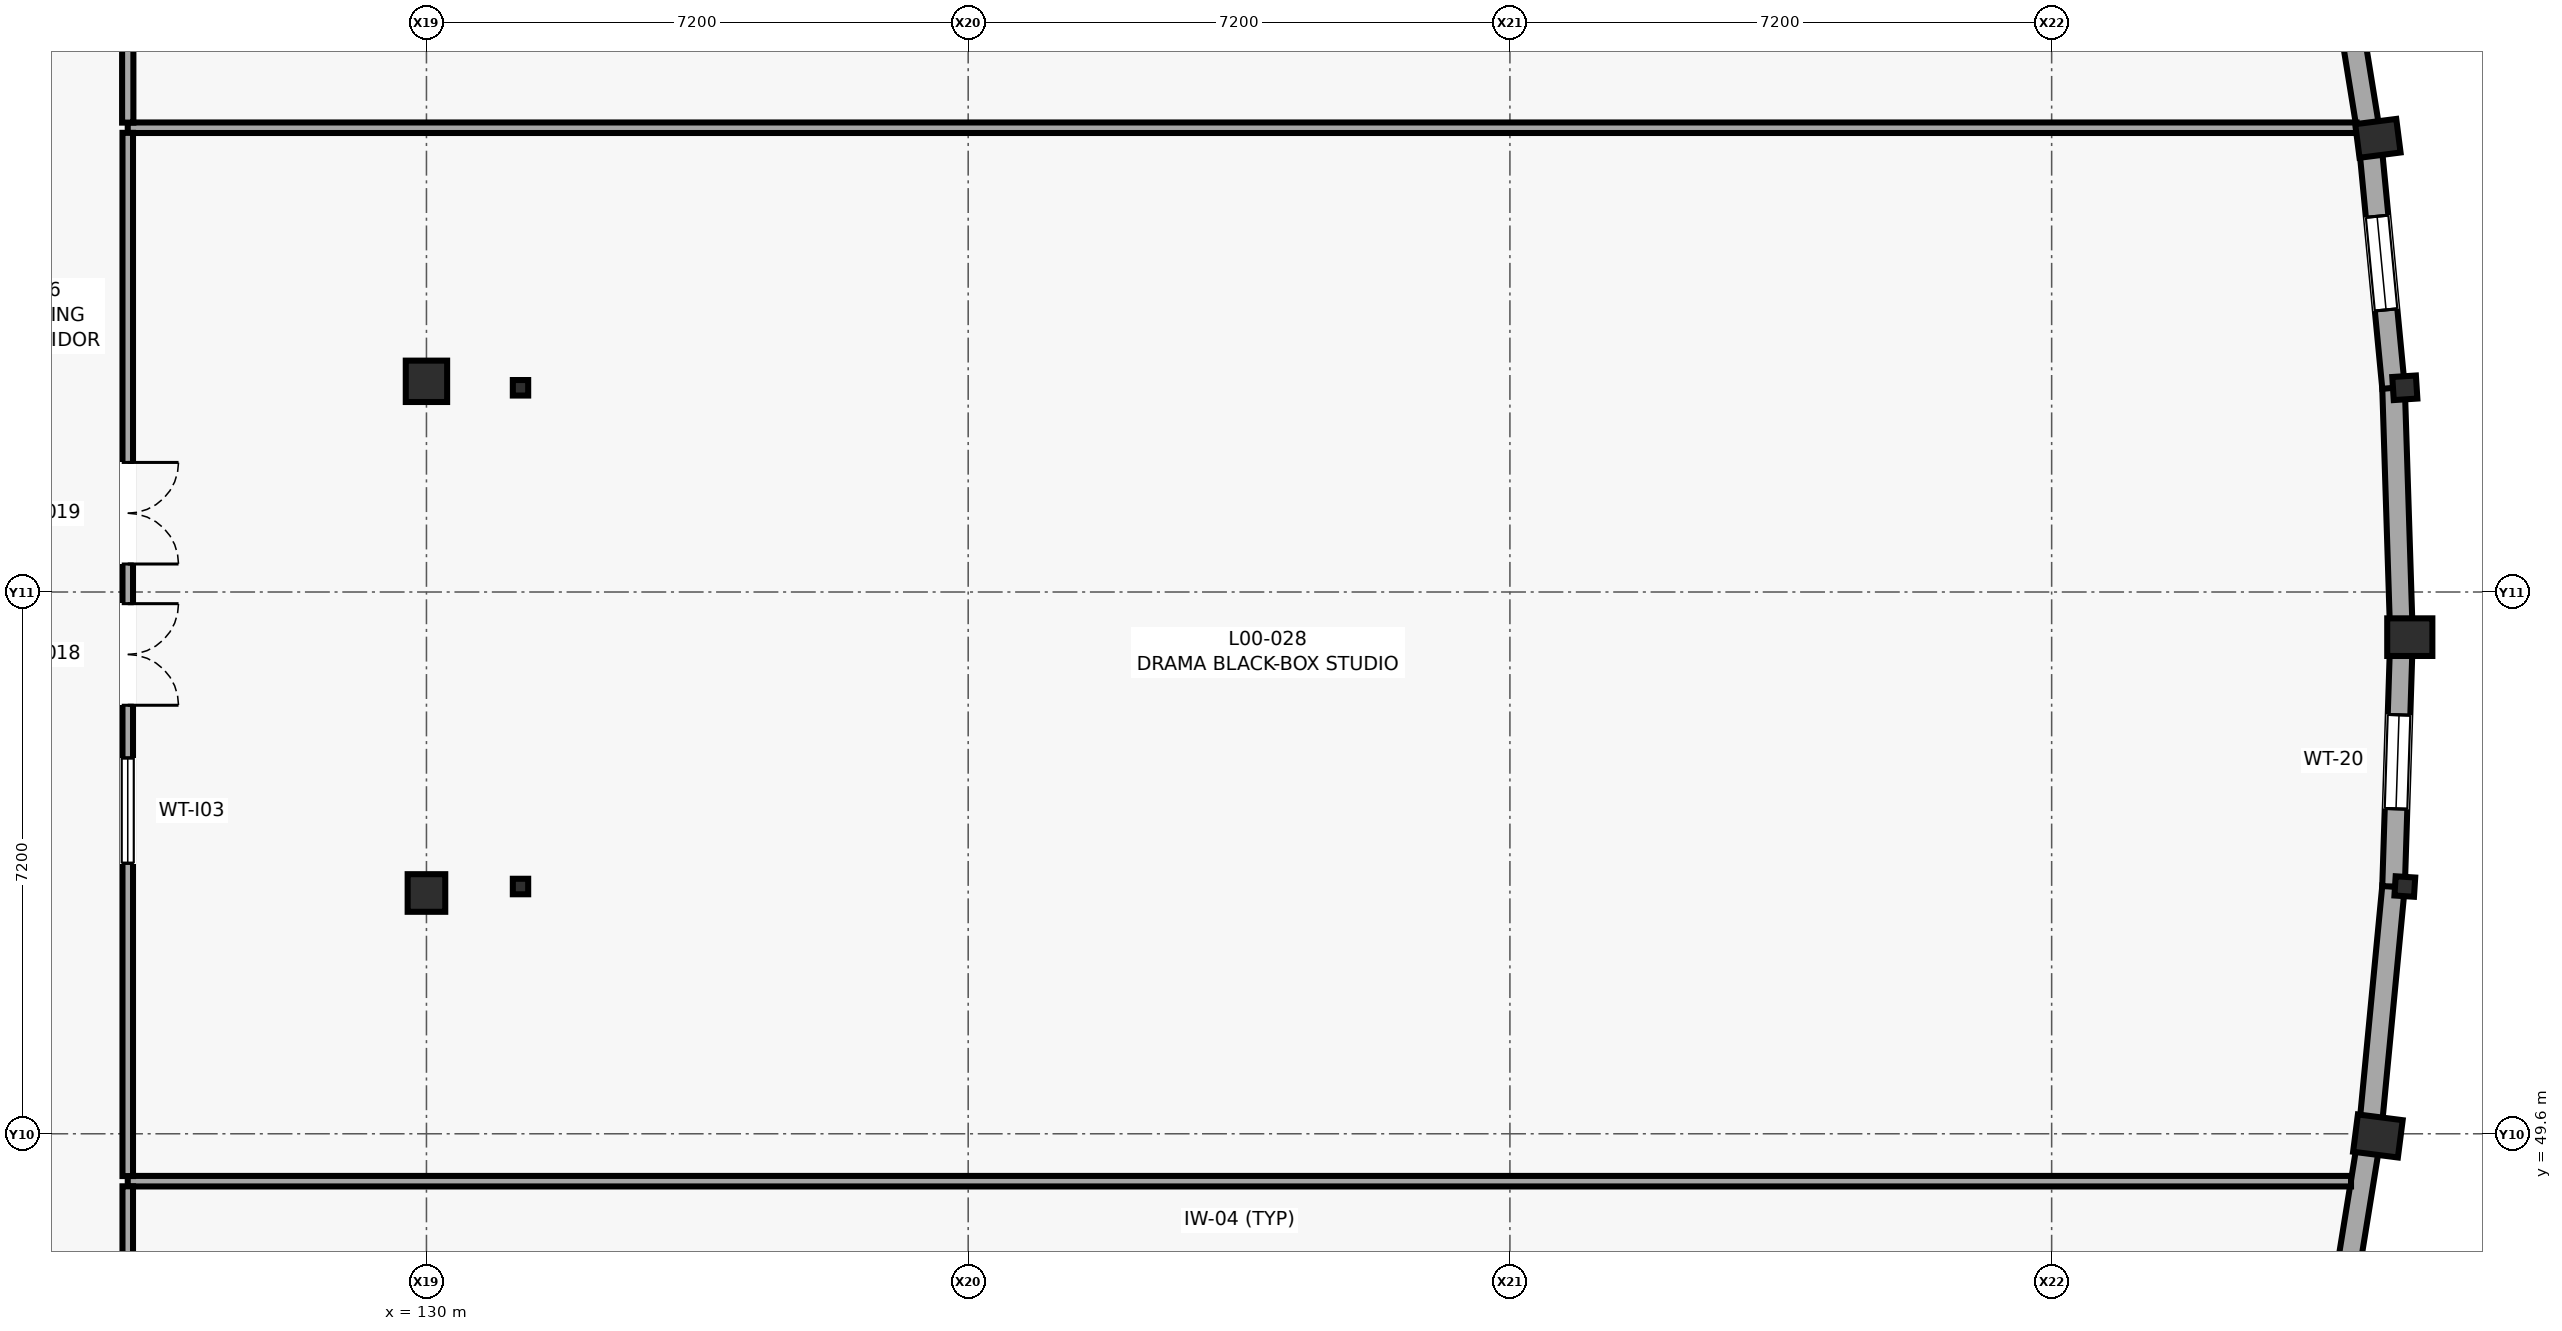
"""IFC4 building model, lengths in metres.
Left out: names, types, materials, properties, quantities, classifications, styles, units other than length and angle.
Written with IfcOpenShell. Run it as: python <this file> out.ifc"""

import sys

from ifc_helpers import new_model, si_unit, direction, frame, frame_2d, origin, origin_2d, place, context, subcontext, project, spatial, rectangle, i_section, extrude, element, fill, save


model = new_model("IFC4")
c1 = context("Model", 3, precision=1e-05, world=origin(), true_north=direction((0.0, 1.0)))
c2 = subcontext(c1, "Body", "Model", "MODEL_VIEW")
j1 = project(units=[si_unit("LENGTHUNIT", "METRE"), si_unit("PLANEANGLEUNIT", "RADIAN")], contexts=[c1])
p1 = place(None, origin())
s1 = spatial("IfcSite", under=j1, at=p1, CompositionType="ELEMENT")
p2 = place(p1, origin())
s2 = spatial("IfcBuilding", under=s1, at=p2, CompositionType="ELEMENT")
p3 = place(p2, origin())
s3 = spatial("IfcBuildingStorey", under=s2, at=p3, CompositionType="ELEMENT", Elevation=0.0)
p4 = place(p3, frame((130.0, 52.8, 0.0), z_axis=(0.0, 0.0, 1.0), x_axis=(1.0, 0.0, 0.0)))
e1 = element("IfcColumn", 1, at=p4, inside=s3, PredefinedType="COLUMN", context=c2, shape_type="SweptSolid", body=[
    extrude(rectangle(XDim=0.5, YDim=0.5, at=origin_2d()), origin(), (0.0, 0.0, 1.0), 4.2),
])
p5 = place(p3, frame((130.0, 59.6, 0.0), z_axis=(0.0, 0.0, 1.0), x_axis=(1.0, 0.0, 0.0)))
e2 = element("IfcColumn", 2, at=p5, inside=s3, PredefinedType="COLUMN", context=c2, shape_type="SweptSolid", body=[
    extrude(rectangle(XDim=0.55, YDim=0.55, at=origin_2d()), origin(), (0.0, 0.0, 1.0), 4.2),
])
p6 = place(p3, frame((155.936, 49.571, 0.0), z_axis=(0.0, 0.0, 1.0), x_axis=(0.12741083733, 0.991850028246, 0.0)))
e3 = element("IfcColumn", 3, at=p6, inside=s3, PredefinedType="PILASTER", context=c2, shape_type="SweptSolid", body=[
    extrude(rectangle(XDim=0.5, YDim=0.6, at=origin_2d()), origin(), (0.0, 0.0, 1.0), 4.2),
])
p7 = place(p3, frame((155.936, 62.829, 0.0), z_axis=(0.0, 0.0, 1.0), x_axis=(-0.12741083733, 0.991850028246, 0.0)))
e4 = element("IfcColumn", 4, at=p7, inside=s3, PredefinedType="PILASTER", context=c2, shape_type="SweptSolid", body=[
    extrude(rectangle(XDim=0.45, YDim=0.55, at=origin_2d()), origin(), (0.0, 0.0, 1.0), 4.2),
])
p8 = place(p3, frame((156.294, 52.886, 0.0), z_axis=(0.0, 0.0, 1.0), x_axis=(0.063661438132, 0.99797155335, 0.0)))
e5 = element("IfcColumn", 5, at=p8, inside=s3, PredefinedType="COLUMN", context=c2, shape_type="SweptSolid", body=[
    extrude(i_section(OverallWidth=0.256, OverallDepth=0.26, WebThickness=0.01, FlangeThickness=0.017, FilletRadius=0.013, at=origin_2d()), origin(), (0.0, 0.0, 1.0), 4.2),
])
p9 = place(p3, frame((156.294, 59.514, 0.0), z_axis=(0.0, 0.0, 1.0), x_axis=(-0.063661438132, 0.99797155335, 0.0)))
e6 = element("IfcColumn", 6, at=p9, inside=s3, PredefinedType="COLUMN", context=c2, shape_type="SweptSolid", body=[
    extrude(i_section(OverallWidth=0.307, OverallDepth=0.314, WebThickness=0.012, FlangeThickness=0.019, FilletRadius=0.015, at=origin_2d()), origin(), (0.0, 0.0, 1.0), 4.2),
])
p10 = place(p3, frame((156.36, 56.2, 0.0), z_axis=(0.0, 0.0, 1.0), x_axis=(0.0, 1.0, 0.0)))
e7 = element("IfcColumn", 7, at=p10, inside=s3, PredefinedType="PILASTER", context=c2, shape_type="SweptSolid", body=[
    extrude(rectangle(XDim=0.5, YDim=0.6, at=origin_2d()), origin(), (0.0, 0.0, 1.0), 4.2),
])
for number, where, z_axis, x_axis in (
    (8, (131.25, 52.886, 0.0), (0.0, 0.0, 1.0), (1.0, 0.0, 0.0)),
    (9, (131.25, 59.514, 0.0), (0.0, 0.0, 1.0), (1.0, 0.0, 0.0)),
):
    element("IfcColumn", number, at=place(p3, frame(where, z_axis=z_axis, x_axis=x_axis)), inside=s3, PredefinedType="COLUMN", context=c2, shape_type="SweptSolid", body=[
        extrude(i_section(OverallWidth=0.204, OverallDepth=0.206, WebThickness=0.008, FlangeThickness=0.012, FilletRadius=0.01, at=origin_2d()), origin(), (0.0, 0.0, 1.0), 3.935),
    ])
p11 = place(p3, frame((155.291, 46.257, 0.0), z_axis=(0.0, 0.0, 1.0), x_axis=(0.159349054769, 0.987222304623, 0.0)))
e10 = element("IfcWall", 10, at=p11, inside=s3, PredefinedType="SOLIDWALL", context=c2, shape_type="SweptSolid", body=[
    extrude(rectangle(XDim=3.357, YDim=0.3, at=frame_2d((1.678, 0.0))), origin(), (0.0, 0.0, 1.0), 3.68),
])
p12 = place(p3, frame((155.826, 49.571, 0.0), z_axis=(0.0, 0.0, 1.0), x_axis=(0.095525216858, 0.995427010355, 0.0)))
e11 = element("IfcWall", 11, at=p12, inside=s3, PredefinedType="SOLIDWALL", context=c2, shape_type="SweptSolid", body=[
    extrude(rectangle(XDim=3.33, YDim=0.3, at=frame_2d((1.665, 0.0))), origin(), (0.0, 0.0, 1.0), 3.68),
])
p13 = place(p3, frame((156.144, 52.886, 0.0), z_axis=(0.0, 0.0, 1.0), x_axis=(0.031956559473, 0.999489258725, 0.0)))
e12 = element("IfcWall", 12, at=p13, inside=s3, PredefinedType="SOLIDWALL", context=c2, shape_type="SweptSolid", body=[
    extrude(rectangle(XDim=3.316, YDim=0.3, at=frame_2d((1.658, 0.0))), origin(), (0.0, 0.0, 1.0), 3.68),
])
p14 = place(p13, frame((1.033, 0.0, 1.15)))
e13 = element("IfcOpeningElement", 13, at=p14, cuts=e12, PredefinedType="OPENING", context=c2, shape_type="SweptSolid", body=[
    extrude(rectangle(XDim=1.25, YDim=1.25, at=frame_2d((0.625, 0.625))), frame((0.0, 0.16, 0.0), z_axis=(0.0, -1.0, 0.0), x_axis=(1.0, 0.0, 0.0)), (0.0, 0.0, 1.0), 0.32),
])
p15 = place(p3, frame((156.25, 56.2, 0.0), z_axis=(0.0, 0.0, 1.0), x_axis=(-0.031956559473, 0.999489258725, 0.0)))
e14 = element("IfcWall", 14, at=p15, inside=s3, PredefinedType="SOLIDWALL", context=c2, shape_type="SweptSolid", body=[
    extrude(rectangle(XDim=3.316, YDim=0.3, at=frame_2d((1.658, 0.0))), origin(), (0.0, 0.0, 1.0), 3.68),
])
p16 = place(p3, frame((156.144, 59.514, 0.0), z_axis=(0.0, 0.0, 1.0), x_axis=(-0.095518246268, 0.995427679256, 0.0)))
e15 = element("IfcWall", 15, at=p16, inside=s3, PredefinedType="SOLIDWALL", context=c2, shape_type="SweptSolid", body=[
    extrude(rectangle(XDim=3.33, YDim=0.3, at=frame_2d((1.665, 0.0))), origin(), (0.0, 0.0, 1.0), 3.68),
])
p17 = place(p16, frame((1.04, 0.0, 1.15)))
e16 = element("IfcOpeningElement", 16, at=p17, cuts=e15, PredefinedType="OPENING", context=c2, shape_type="SweptSolid", body=[
    extrude(rectangle(XDim=1.25, YDim=1.25, at=frame_2d((0.625, 0.625))), frame((0.0, 0.16, 0.0), z_axis=(0.0, -1.0, 0.0), x_axis=(1.0, 0.0, 0.0)), (0.0, 0.0, 1.0), 0.32),
])
p18 = place(p3, frame((155.826, 62.829, 0.0), z_axis=(0.0, 0.0, 1.0), x_axis=(-0.159349054769, 0.987222304623, 0.0)))
e17 = element("IfcWall", 17, at=p18, inside=s3, PredefinedType="SOLIDWALL", context=c2, shape_type="SweptSolid", body=[
    extrude(rectangle(XDim=3.357, YDim=0.3, at=frame_2d((1.678, 0.0))), origin(), (0.0, 0.0, 1.0), 3.68),
])
p19 = place(p3, frame((155.579, 48.97, 0.0), z_axis=(0.0, 0.0, 1.0), x_axis=(-1.0, 0.0, 0.0)))
e18 = element("IfcWall", 18, at=p19, inside=s3, PredefinedType="PARTITIONING", context=c2, shape_type="SweptSolid", body=[
    extrude(rectangle(XDim=29.549, YDim=0.14, at=frame_2d((14.774, 0.0))), origin(), (0.0, 0.0, 1.0), 3.93),
])
p20 = place(p3, frame((126.03, 48.902, 0.0), z_axis=(0.0, 0.0, 1.0), x_axis=(0.0, -1.0, 0.0)))
e19 = element("IfcWall", 19, at=p20, inside=s3, PredefinedType="PARTITIONING", context=c2, shape_type="SweptSolid", body=[
    extrude(rectangle(XDim=4.272, YDim=0.14, at=frame_2d((2.136, 0.0))), origin(), (0.0, 0.0, 1.0), 3.93),
])
p21 = place(p20, frame((1.311, 0.0, 0.0)))
e20 = element("IfcOpeningElement", 20, at=p21, cuts=e19, PredefinedType="OPENING", context=c2, shape_type="SweptSolid", body=[
    extrude(rectangle(XDim=1.65, YDim=2.32, at=frame_2d((0.825, 1.16))), frame((0.0, 0.08, 0.0), z_axis=(0.0, -1.0, 0.0), x_axis=(1.0, 0.0, 0.0)), (0.0, 0.0, 1.0), 0.16),
])
p22 = place(p3, frame((155.653, 62.97, 0.0), z_axis=(0.0, 0.0, 1.0), x_axis=(-1.0, 0.0, 0.0)))
e21 = element("IfcWall", 21, at=p22, inside=s3, PredefinedType="PARTITIONING", context=c2, shape_type="SweptSolid", body=[
    extrude(rectangle(XDim=29.623, YDim=0.14, at=frame_2d((14.812, 0.0))), origin(), (0.0, 0.0, 1.0), 3.93),
])
p23 = place(p3, frame((126.03, 62.902, 0.0), z_axis=(0.0, 0.0, 1.0), x_axis=(0.0, -1.0, 0.0)))
e22 = element("IfcWall", 22, at=p23, inside=s3, PredefinedType="PARTITIONING", context=c2, shape_type="SweptSolid", body=[
    extrude(rectangle(XDim=13.864, YDim=0.14, at=frame_2d((6.932, 0.0))), origin(), (0.0, 0.0, 1.0), 3.93),
])
p24 = place(p23, frame((6.257, 0.0, 0.0)))
e23 = element("IfcOpeningElement", 23, at=p24, cuts=e22, PredefinedType="OPENING", context=c2, shape_type="SweptSolid", body=[
    extrude(rectangle(XDim=1.35, YDim=2.25, at=frame_2d((0.675, 1.125))), frame((0.0, 0.08, 0.0), z_axis=(0.0, -1.0, 0.0), x_axis=(1.0, 0.0, 0.0)), (0.0, 0.0, 1.0), 0.16),
])
p25 = place(p23, frame((4.38, 0.0, 0.0)))
e24 = element("IfcOpeningElement", 24, at=p25, cuts=e22, PredefinedType="OPENING", context=c2, shape_type="SweptSolid", body=[
    extrude(rectangle(XDim=1.35, YDim=2.25, at=frame_2d((0.675, 1.125))), frame((0.0, 0.08, 0.0), z_axis=(0.0, -1.0, 0.0), x_axis=(1.0, 0.0, 0.0)), (0.0, 0.0, 1.0), 0.16),
])
p26 = place(p23, frame((8.307, 0.0, 1.05)))
e25 = element("IfcOpeningElement", 25, at=p26, cuts=e22, PredefinedType="OPENING", context=c2, shape_type="SweptSolid", body=[
    extrude(rectangle(XDim=1.4, YDim=1.05, at=frame_2d((0.7, 0.525))), frame((0.0, 0.08, 0.0), z_axis=(0.0, -1.0, 0.0), x_axis=(1.0, 0.0, 0.0)), (0.0, 0.0, 1.0), 0.16),
])
p27 = place(p3, frame((126.03, 67.77, 0.0), z_axis=(0.0, 0.0, 1.0), x_axis=(0.0, -1.0, 0.0)))
e26 = element("IfcWall", 26, at=p27, inside=s3, PredefinedType="PARTITIONING", context=c2, shape_type="SweptSolid", body=[
    extrude(rectangle(XDim=4.732, YDim=0.15, at=frame_2d((2.366, 0.0))), origin(), (0.0, 0.0, 1.0), 3.93),
])
p28 = place(p27, frame((1.891, 0.0, 0.0)))
e27 = element("IfcOpeningElement", 27, at=p28, cuts=e26, PredefinedType="OPENING", context=c2, shape_type="SweptSolid", body=[
    extrude(rectangle(XDim=0.95, YDim=2.1, at=frame_2d((0.475, 1.05))), frame((0.0, 0.085, 0.0), z_axis=(0.0, -1.0, 0.0), x_axis=(1.0, 0.0, 0.0)), (0.0, 0.0, 1.0), 0.17),
])
p29 = place(p14, origin())
e28 = element("IfcWindow", 28, at=p29, inside=s3, PartitioningType="SINGLE_PANEL", PredefinedType="WINDOW", context=c2, shape_type="SweptSolid", body=[
    extrude(rectangle(XDim=1.25, YDim=1.25, at=frame_2d((0.625, 0.625))), frame((0.0, 0.03, 0.0), z_axis=(0.0, -1.0, 0.0), x_axis=(1.0, 0.0, 0.0)), (0.0, 0.0, 1.0), 0.06),
])
fill(e13, e28)
p30 = place(p17, origin())
e29 = element("IfcWindow", 29, at=p30, inside=s3, PartitioningType="SINGLE_PANEL", PredefinedType="WINDOW", context=c2, shape_type="SweptSolid", body=[
    extrude(rectangle(XDim=1.25, YDim=1.25, at=frame_2d((0.625, 0.625))), frame((0.0, 0.03, 0.0), z_axis=(0.0, -1.0, 0.0), x_axis=(1.0, 0.0, 0.0)), (0.0, 0.0, 1.0), 0.06),
])
fill(e16, e29)
p31 = place(p24, origin())
e30 = element("IfcDoor", 30, at=p31, inside=s3, OperationType="DOUBLE_DOOR_SINGLE_SWING", PredefinedType="DOOR", context=c2, shape_type="SweptSolid", body=[
    extrude(rectangle(XDim=1.35, YDim=2.25, at=frame_2d((0.675, 1.125))), frame((0.0, 0.025, 0.0), z_axis=(0.0, -1.0, 0.0), x_axis=(1.0, 0.0, 0.0)), (0.0, 0.0, 1.0), 0.05),
])
fill(e23, e30)
p32 = place(p25, origin())
e31 = element("IfcDoor", 31, at=p32, inside=s3, OperationType="DOUBLE_DOOR_SINGLE_SWING", PredefinedType="DOOR", context=c2, shape_type="SweptSolid", body=[
    extrude(rectangle(XDim=1.35, YDim=2.25, at=frame_2d((0.675, 1.125))), frame((0.0, 0.025, 0.0), z_axis=(0.0, -1.0, 0.0), x_axis=(1.0, 0.0, 0.0)), (0.0, 0.0, 1.0), 0.05),
])
fill(e24, e31)
p33 = place(p26, origin())
e32 = element("IfcWindow", 32, at=p33, inside=s3, PartitioningType="SINGLE_PANEL", PredefinedType="WINDOW", context=c2, shape_type="SweptSolid", body=[
    extrude(rectangle(XDim=1.4, YDim=1.05, at=frame_2d((0.7, 0.525))), frame((0.0, 0.03, 0.0), z_axis=(0.0, -1.0, 0.0), x_axis=(1.0, 0.0, 0.0)), (0.0, 0.0, 1.0), 0.06),
])
fill(e25, e32)
save(model, sys.argv[1])
